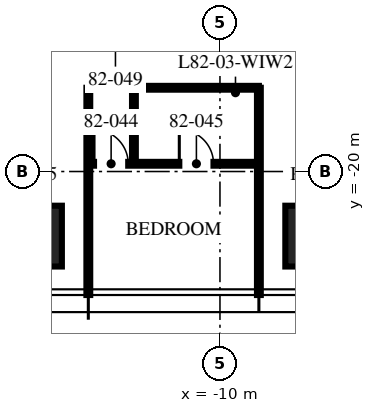
"""IFC4 building model, lengths in metres.
Left out: names, types, materials, properties, quantities, classifications, styles, units other than length and angle.
Written with IfcOpenShell. Run it as: python <this file> out.ifc"""

import sys

from ifc_helpers import new_model, si_unit, direction, frame, frame_2d, origin, origin_2d, place, context, subcontext, project, spatial, rectangle, extrude, element, fill, save


model = new_model("IFC4")
c1 = context("Model", 3, precision=1e-05, world=origin(), true_north=direction((0.0, 1.0)))
c2 = subcontext(c1, "Body", "Model", "MODEL_VIEW")
j1 = project(units=[si_unit("LENGTHUNIT", "METRE"), si_unit("PLANEANGLEUNIT", "RADIAN")], contexts=[c1])
p1 = place(None, origin())
s1 = spatial("IfcSite", under=j1, at=p1, CompositionType="ELEMENT")
p2 = place(p1, origin())
s2 = spatial("IfcBuilding", under=s1, at=p2, CompositionType="ELEMENT")
p3 = place(p2, frame((0.0, 0.0, 327.0)))
s3 = spatial("IfcBuildingStorey", under=s2, at=p3, CompositionType="ELEMENT", Elevation=327.0)
for number, where, z_axis, x_axis in (
    (1, (-7.48, -21.7, 0.0), (0.0, 0.0, 1.0), (1.0, 0.0, 0.0)),
    (2, (-14.96, -21.7, 0.0), (0.0, 0.0, 1.0), (1.0, 0.0, 0.0)),
):
    element("IfcColumn", number, at=place(p3, frame(where, z_axis=z_axis, x_axis=x_axis)), inside=s3, PredefinedType="COLUMN", context=c2, shape_type="SweptSolid", body=[
        extrude(rectangle(XDim=1.6, YDim=1.6, at=origin_2d()), origin(), (0.0, 0.0, 1.0), 3.75),
    ])
for number, where, z_axis, x_axis in (
    (3, (-13.464, -17.796, 0.0), (0.0, 0.0, 1.0), (0.0, -1.0, 0.0)),
    (4, (-8.976, -17.796, 0.0), (0.0, 0.0, 1.0), (0.0, -1.0, 0.0)),
):
    element("IfcWall", number, at=place(p3, frame(where, z_axis=z_axis, x_axis=x_axis)), inside=s3, PredefinedType="PARTITIONING", context=c2, shape_type="SweptSolid", body=[
        extrude(rectangle(XDim=5.454, YDim=0.1, at=frame_2d((2.727, 0.0))), origin(), (0.0, 0.0, 1.0), 3.01),
    ])
p4 = place(p3, frame((-13.464, -19.796, 0.0), z_axis=(0.0, 0.0, 1.0), x_axis=(1.0, 0.0, 0.0)))
e5 = element("IfcWall", 5, at=p4, inside=s3, PredefinedType="PARTITIONING", context=c2, shape_type="SweptSolid", body=[
    extrude(rectangle(XDim=4.488, YDim=0.1, at=frame_2d((2.244, 0.0))), origin(), (0.0, 0.0, 1.0), 2.91),
])
p5 = place(p4, frame((0.15, 0.0, 0.0)))
e6 = element("IfcOpeningElement", 6, at=p5, cuts=e5, PredefinedType="OPENING", context=c2, shape_type="SweptSolid", body=[
    extrude(rectangle(XDim=0.9, YDim=2.1, at=frame_2d((0.45, 1.05))), frame((0.0, 0.06, 0.0), z_axis=(0.0, -1.0, 0.0), x_axis=(1.0, 0.0, 0.0)), (0.0, 0.0, 1.0), 0.12),
])
p6 = place(p4, frame((2.394, 0.0, 0.0)))
e7 = element("IfcOpeningElement", 7, at=p6, cuts=e5, PredefinedType="OPENING", context=c2, shape_type="SweptSolid", body=[
    extrude(rectangle(XDim=0.9, YDim=2.1, at=frame_2d((0.45, 1.05))), frame((0.0, 0.06, 0.0), z_axis=(0.0, -1.0, 0.0), x_axis=(1.0, 0.0, 0.0)), (0.0, 0.0, 1.0), 0.12),
])
p7 = place(p3, frame((-12.264, -17.796, 0.0), z_axis=(0.0, 0.0, 1.0), x_axis=(0.0, -1.0, 0.0)))
e8 = element("IfcWall", 8, at=p7, inside=s3, PredefinedType="PARTITIONING", context=c2, shape_type="SweptSolid", body=[
    extrude(rectangle(XDim=2.0, YDim=0.1, at=frame_2d((1.0, 0.0))), origin(), (0.0, 0.0, 1.0), 3.5),
])
p8 = place(p3, frame((-12.264, -17.796, 0.0), z_axis=(0.0, 0.0, 1.0), x_axis=(1.0, 0.0, 0.0)))
e9 = element("IfcWall", 9, at=p8, inside=s3, PredefinedType="PARTITIONING", context=c2, shape_type="SweptSolid", body=[
    extrude(rectangle(XDim=3.288, YDim=0.1, at=frame_2d((1.644, 0.0))), origin(), (0.0, 0.0, 1.0), 2.91),
])
p9 = place(p5, origin())
e10 = element("IfcDoor", 10, at=p9, inside=s3, OperationType="SINGLE_SWING_LEFT", PredefinedType="DOOR", context=c2, shape_type="SweptSolid", body=[
    extrude(rectangle(XDim=0.9, YDim=2.1, at=frame_2d((0.45, 1.05))), frame((0.0, 0.025, 0.0), z_axis=(0.0, -1.0, 0.0), x_axis=(1.0, 0.0, 0.0)), (0.0, 0.0, 1.0), 0.05),
])
fill(e6, e10)
p10 = place(p6, origin())
e11 = element("IfcDoor", 11, at=p10, inside=s3, OperationType="SINGLE_SWING_LEFT", PredefinedType="DOOR", context=c2, shape_type="SweptSolid", body=[
    extrude(rectangle(XDim=0.9, YDim=2.1, at=frame_2d((0.45, 1.05))), frame((0.0, 0.025, 0.0), z_axis=(0.0, -1.0, 0.0), x_axis=(1.0, 0.0, 0.0)), (0.0, 0.0, 1.0), 0.05),
])
fill(e7, e11)
save(model, sys.argv[1])
